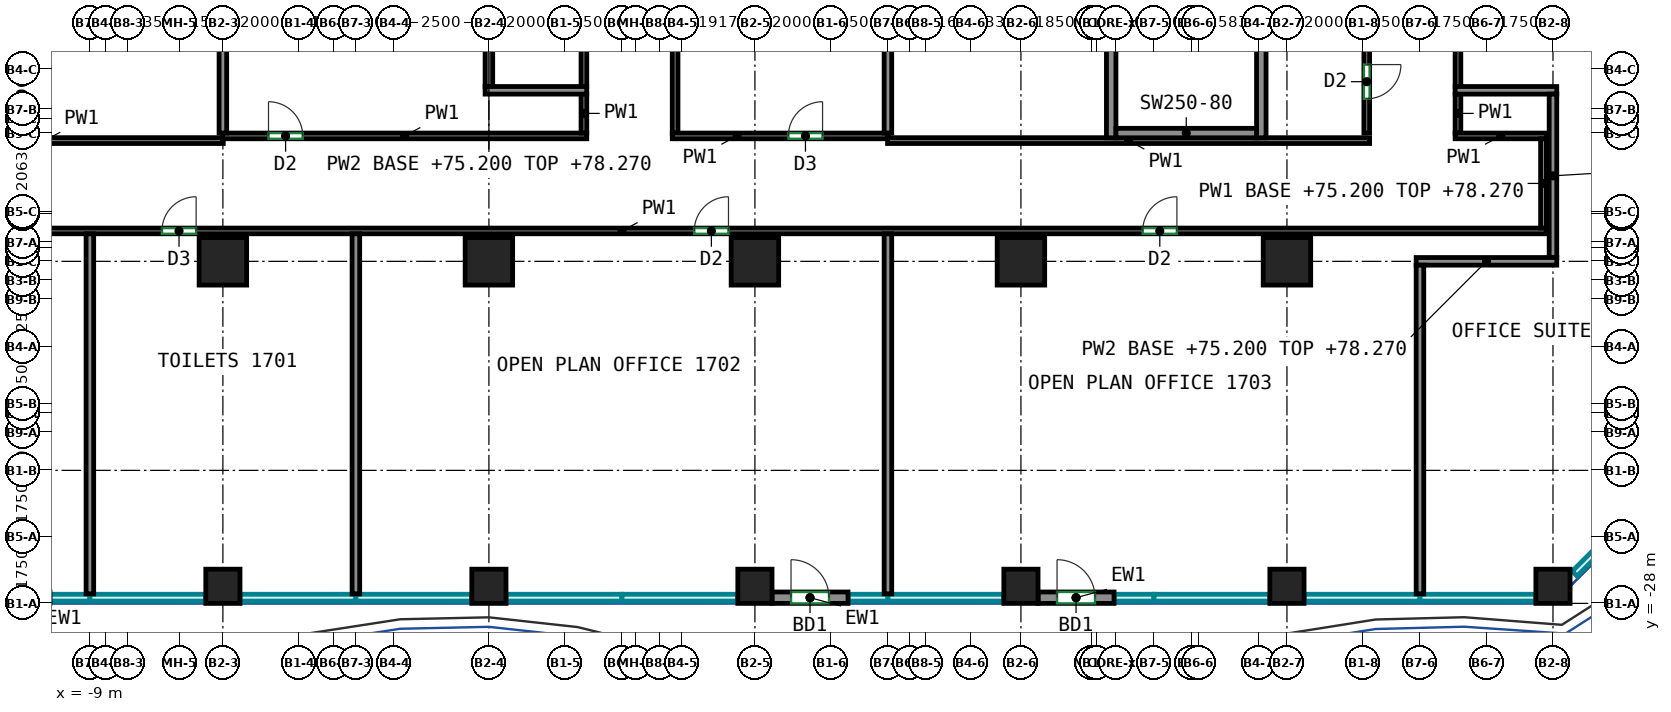
"""IFC4 building model, lengths in metres.
Left out: names, types, materials, properties, quantities, classifications, styles, units other than length and angle.
Written with IfcOpenShell. Run it as: python <this file> out.ifc"""

import sys

from ifc_helpers import new_model, si_unit, direction, frame, frame_2d, origin, origin_2d, place, context, subcontext, project, spatial, rectangle, extrude, source, transform, mapped, element, fill, save


model = new_model("IFC4")
c1 = context("Model", 3, precision=1e-05, world=origin(), true_north=direction((0.0, 1.0)))
c2 = subcontext(c1, "Body", "Model", "MODEL_VIEW")
j1 = project(units=[si_unit("LENGTHUNIT", "METRE"), si_unit("PLANEANGLEUNIT", "RADIAN")], contexts=[c1])
p1 = place(None, origin())
s1 = spatial("IfcSite", under=j1, at=p1, CompositionType="ELEMENT")
p2 = place(p1, origin())
s2 = spatial("IfcBuilding", under=s1, at=p2, CompositionType="ELEMENT")
p3 = place(p2, frame((0.0, 0.0, 75.2)))
s3 = spatial("IfcBuildingStorey", under=s2, at=p3, CompositionType="ELEMENT", Elevation=75.2)
m1 = source(origin(), c2, "Body", "SweptSolid", [
    extrude(rectangle(XDim=0.9, YDim=0.9, at=origin_2d()), origin(), (0.0, 0.0, 1.0), 3.72),
])
p4 = place(p3, frame((-5.5, -27.55, 0.0), z_axis=(0.0, 0.0, 1.0), x_axis=(1.0, 0.0, 0.0)))
e1 = element("IfcColumn", 1, at=p4, inside=s3, PredefinedType="COLUMN", context=c2, shape_type="MappedRepresentation", body=[
    mapped(m1, transform((0.0, 0.0, 0.0))),
])
m2 = source(origin(), c2, "Body", "SweptSolid", [
    extrude(rectangle(XDim=1.25, YDim=1.25, at=origin_2d()), origin(), (0.0, 0.0, 1.0), 3.72),
])
p5 = place(p3, frame((-5.5, -19.0, 0.0), z_axis=(0.0, 0.0, 1.0), x_axis=(1.0, 0.0, 0.0)))
e2 = element("IfcColumn", 2, at=p5, inside=s3, PredefinedType="COLUMN", context=c2, shape_type="MappedRepresentation", body=[
    mapped(m2, transform((0.0, 0.0, 0.0))),
])
p6 = place(p3, frame((1.5, -27.55, 0.0), z_axis=(0.0, 0.0, 1.0), x_axis=(1.0, 0.0, 0.0)))
e3 = element("IfcColumn", 3, at=p6, inside=s3, PredefinedType="COLUMN", context=c2, shape_type="MappedRepresentation", body=[
    mapped(m1, transform((0.0, 0.0, 0.0))),
])
p7 = place(p3, frame((1.5, -19.0, 0.0), z_axis=(0.0, 0.0, 1.0), x_axis=(1.0, 0.0, 0.0)))
e4 = element("IfcColumn", 4, at=p7, inside=s3, PredefinedType="COLUMN", context=c2, shape_type="MappedRepresentation", body=[
    mapped(m2, transform((0.0, 0.0, 0.0))),
])
p8 = place(p3, frame((8.5, -27.55, 0.0), z_axis=(0.0, 0.0, 1.0), x_axis=(1.0, 0.0, 0.0)))
e5 = element("IfcColumn", 5, at=p8, inside=s3, PredefinedType="COLUMN", context=c2, shape_type="MappedRepresentation", body=[
    mapped(m1, transform((0.0, 0.0, 0.0))),
])
p9 = place(p3, frame((8.5, -19.0, 0.0), z_axis=(0.0, 0.0, 1.0), x_axis=(1.0, 0.0, 0.0)))
e6 = element("IfcColumn", 6, at=p9, inside=s3, PredefinedType="COLUMN", context=c2, shape_type="MappedRepresentation", body=[
    mapped(m2, transform((0.0, 0.0, 0.0))),
])
p10 = place(p3, frame((15.5, -27.55, 0.0), z_axis=(0.0, 0.0, 1.0), x_axis=(1.0, 0.0, 0.0)))
e7 = element("IfcColumn", 7, at=p10, inside=s3, PredefinedType="COLUMN", context=c2, shape_type="MappedRepresentation", body=[
    mapped(m1, transform((0.0, 0.0, 0.0))),
])
p11 = place(p3, frame((15.5, -19.0, 0.0), z_axis=(0.0, 0.0, 1.0), x_axis=(1.0, 0.0, 0.0)))
e8 = element("IfcColumn", 8, at=p11, inside=s3, PredefinedType="COLUMN", context=c2, shape_type="MappedRepresentation", body=[
    mapped(m2, transform((0.0, 0.0, 0.0))),
])
p12 = place(p3, frame((22.5, -27.55, 0.0), z_axis=(0.0, 0.0, 1.0), x_axis=(1.0, 0.0, 0.0)))
e9 = element("IfcColumn", 9, at=p12, inside=s3, PredefinedType="COLUMN", context=c2, shape_type="MappedRepresentation", body=[
    mapped(m1, transform((0.0, 0.0, 0.0))),
])
p13 = place(p3, frame((22.5, -19.0, 0.0), z_axis=(0.0, 0.0, 1.0), x_axis=(1.0, 0.0, 0.0)))
e10 = element("IfcColumn", 10, at=p13, inside=s3, PredefinedType="COLUMN", context=c2, shape_type="MappedRepresentation", body=[
    mapped(m2, transform((0.0, 0.0, 0.0))),
])
p14 = place(p3, frame((29.5, -27.55, 0.0), z_axis=(0.0, 0.0, 1.0), x_axis=(1.0, 0.0, 0.0)))
e11 = element("IfcColumn", 11, at=p14, inside=s3, PredefinedType="COLUMN", context=c2, shape_type="MappedRepresentation", body=[
    mapped(m1, transform((0.0, 0.0, 0.0))),
])
m3 = source(origin(), c2, "Body", "SweptSolid", [
    extrude(rectangle(XDim=8.0, YDim=0.25, at=frame_2d((4.0, 0.0))), origin(), (0.0, 0.0, 1.0), 3.72),
])
for number, where, z_axis, x_axis in (
    (12, (17.875, -15.75, 0.0), (0.0, 0.0, 1.0), (0.0, 1.0, 0.0)),
    (13, (21.825, -15.75, 0.0), (0.0, 0.0, 1.0), (0.0, 1.0, 0.0)),
):
    element("IfcWall", number, at=place(p3, frame(where, z_axis=z_axis, x_axis=x_axis)), inside=s3, PredefinedType="SHEAR", context=c2, shape_type="MappedRepresentation", body=[
        mapped(m3, transform((0.0, 0.0, 0.0))),
    ])
m4 = source(origin(), c2, "Body", "SweptSolid", [
    extrude(rectangle(XDim=3.7, YDim=0.25, at=frame_2d((1.85, 0.0))), origin(), (0.0, 0.0, 1.0), 3.72),
])
p15 = place(p3, frame((18.0, -15.625, 0.0), z_axis=(0.0, 0.0, 1.0), x_axis=(1.0, 0.0, 0.0)))
e14 = element("IfcWall", 14, at=p15, inside=s3, PredefinedType="SHEAR", context=c2, shape_type="MappedRepresentation", body=[
    mapped(m4, transform((0.0, 0.0, 0.0))),
])
m5 = source(origin(), c2, "Body", "SweptSolid", [
    extrude(rectangle(XDim=2.0, YDim=0.3, at=frame_2d((1.0, 0.0))), origin(), (0.0, 0.0, 1.0), 3.72),
])
p16 = place(p3, frame((8.95, -27.85, 0.0), z_axis=(0.0, 0.0, 1.0), x_axis=(1.0, 0.0, 0.0)))
e15 = element("IfcWall", 15, at=p16, inside=s3, PredefinedType="SOLIDWALL", context=c2, shape_type="MappedRepresentation", body=[
    mapped(m5, transform((0.0, 0.0, 0.0))),
])
p17 = place(p16, frame((0.5, 0.0, 0.0)))
e16 = element("IfcOpeningElement", 16, at=p17, cuts=e15, PredefinedType="OPENING", context=c2, shape_type="SweptSolid", body=[
    extrude(rectangle(XDim=1.0, YDim=2.1, at=frame_2d((0.5, 1.05))), frame((0.0, 0.16, 0.0), z_axis=(0.0, -1.0, 0.0), x_axis=(1.0, 0.0, 0.0)), (0.0, 0.0, 1.0), 0.32),
])
p18 = place(p3, frame((15.95, -27.85, 0.0), z_axis=(0.0, 0.0, 1.0), x_axis=(1.0, 0.0, 0.0)))
e17 = element("IfcWall", 17, at=p18, inside=s3, PredefinedType="SOLIDWALL", context=c2, shape_type="MappedRepresentation", body=[
    mapped(m5, transform((0.0, 0.0, 0.0))),
])
p19 = place(p18, frame((0.5, 0.0, 0.0)))
e18 = element("IfcOpeningElement", 18, at=p19, cuts=e17, PredefinedType="OPENING", context=c2, shape_type="SweptSolid", body=[
    extrude(rectangle(XDim=1.0, YDim=2.1, at=frame_2d((0.5, 1.05))), frame((0.0, 0.16, 0.0), z_axis=(0.0, -1.0, 0.0), x_axis=(1.0, 0.0, 0.0)), (0.0, 0.0, 1.0), 0.32),
])
p20 = place(p3, frame((-19.325, -18.2, 0.0), z_axis=(0.0, 0.0, 1.0), x_axis=(1.0, 0.0, 0.0)))
e19 = element("IfcWall", 19, at=p20, inside=s3, PredefinedType="PARTITIONING", context=c2, shape_type="SweptSolid", body=[
    extrude(rectangle(XDim=48.65, YDim=0.15, at=frame_2d((24.325, 0.0))), origin(), (0.0, 0.0, 1.0), 3.72),
])
p21 = place(p20, frame((12.221, 0.0, 0.0)))
e20 = element("IfcOpeningElement", 20, at=p21, cuts=e19, PredefinedType="OPENING", context=c2, shape_type="SweptSolid", body=[
    extrude(rectangle(XDim=0.9, YDim=2.1, at=frame_2d((0.45, 1.05))), frame((0.0, 0.085, 0.0), z_axis=(0.0, -1.0, 0.0), x_axis=(1.0, 0.0, 0.0)), (0.0, 0.0, 1.0), 0.17),
])
p22 = place(p20, frame((26.229, 0.0, 0.0)))
e21 = element("IfcOpeningElement", 21, at=p22, cuts=e19, PredefinedType="OPENING", context=c2, shape_type="SweptSolid", body=[
    extrude(rectangle(XDim=0.9, YDim=2.1, at=frame_2d((0.45, 1.05))), frame((0.0, 0.085, 0.0), z_axis=(0.0, -1.0, 0.0), x_axis=(1.0, 0.0, 0.0)), (0.0, 0.0, 1.0), 0.17),
])
p23 = place(p20, frame((38.029, 0.0, 0.0)))
e22 = element("IfcOpeningElement", 22, at=p23, cuts=e19, PredefinedType="OPENING", context=c2, shape_type="SweptSolid", body=[
    extrude(rectangle(XDim=0.9, YDim=2.1, at=frame_2d((0.45, 1.05))), frame((0.0, 0.085, 0.0), z_axis=(0.0, -1.0, 0.0), x_axis=(1.0, 0.0, 0.0)), (0.0, 0.0, 1.0), 0.17),
])
p24 = place(p3, frame((-14.9, -15.825, 0.0), z_axis=(0.0, 0.0, 1.0), x_axis=(1.0, 0.0, 0.0)))
e23 = element("IfcWall", 23, at=p24, inside=s3, PredefinedType="PARTITIONING", context=c2, shape_type="SweptSolid", body=[
    extrude(rectangle(XDim=9.41, YDim=0.15, at=frame_2d((4.705, 0.0))), origin(), (0.0, 0.0, 1.0), 3.72),
])
p25 = place(p3, frame((-5.51, -15.7, 0.0), z_axis=(0.0, 0.0, 1.0), x_axis=(1.0, 0.0, 0.0)))
e24 = element("IfcWall", 24, at=p25, inside=s3, PredefinedType="PARTITIONING", context=c2, shape_type="SweptSolid", body=[
    extrude(rectangle(XDim=9.585, YDim=0.15, at=frame_2d((4.792, 0.0))), origin(), (0.0, 0.0, 1.0), 3.72),
])
p26 = place(p25, frame((1.21, 0.0, 0.0)))
e25 = element("IfcOpeningElement", 25, at=p26, cuts=e24, PredefinedType="OPENING", context=c2, shape_type="SweptSolid", body=[
    extrude(rectangle(XDim=0.9, YDim=2.1, at=frame_2d((0.45, 1.05))), frame((0.0, 0.085, 0.0), z_axis=(0.0, -1.0, 0.0), x_axis=(1.0, 0.0, 0.0)), (0.0, 0.0, 1.0), 0.17),
])
p27 = place(p3, frame((4.0, -15.625, 0.0), z_axis=(0.0, 0.0, 1.0), x_axis=(0.0, 1.0, 0.0)))
e26 = element("IfcWall", 26, at=p27, inside=s3, PredefinedType="PARTITIONING", context=c2, shape_type="SweptSolid", body=[
    extrude(rectangle(XDim=1.035, YDim=0.15, at=frame_2d((0.518, 0.0))), origin(), (0.0, 0.0, 1.0), 3.72),
])
p28 = place(p3, frame((4.0, -14.41, 0.0), z_axis=(0.0, 0.0, 1.0), x_axis=(0.0, 1.0, 0.0)))
e27 = element("IfcWall", 27, at=p28, inside=s3, PredefinedType="PARTITIONING", context=c2, shape_type="SweptSolid", body=[
    extrude(rectangle(XDim=16.635, YDim=0.15, at=frame_2d((8.317, 0.0))), origin(), (0.0, 0.0, 1.0), 3.72),
])
p29 = place(p28, frame((6.114, 0.0, 0.0)))
e28 = element("IfcOpeningElement", 28, at=p29, cuts=e27, PredefinedType="OPENING", context=c2, shape_type="SweptSolid", body=[
    extrude(rectangle(XDim=1.0, YDim=2.1, at=frame_2d((0.5, 1.05))), frame((0.0, 0.085, 0.0), z_axis=(0.0, -1.0, 0.0), x_axis=(1.0, 0.0, 0.0)), (0.0, 0.0, 1.0), 0.17),
])
p30 = place(p3, frame((27.0, -15.625, 0.0), z_axis=(0.0, 0.0, 1.0), x_axis=(0.0, 1.0, 0.0)))
e29 = element("IfcWall", 29, at=p30, inside=s3, PredefinedType="PARTITIONING", context=c2, shape_type="SweptSolid", body=[
    extrude(rectangle(XDim=1.035, YDim=0.15, at=frame_2d((0.518, 0.0))), origin(), (0.0, 0.0, 1.0), 3.72),
])
p31 = place(p3, frame((26.925, -15.7, 0.0), z_axis=(0.0, 0.0, 1.0), x_axis=(1.0, 0.0, 0.0)))
e30 = element("IfcWall", 30, at=p31, inside=s3, PredefinedType="PARTITIONING", context=c2, shape_type="SweptSolid", body=[
    extrude(rectangle(XDim=2.4, YDim=0.15, at=frame_2d((1.2, 0.0))), origin(), (0.0, 0.0, 1.0), 3.72),
])
p32 = place(p3, frame((29.25, -18.125, 0.0), z_axis=(0.0, 0.0, 1.0), x_axis=(0.0, 1.0, 0.0)))
e31 = element("IfcWall", 31, at=p32, inside=s3, PredefinedType="PARTITIONING", context=c2, shape_type="SweptSolid", body=[
    extrude(rectangle(XDim=2.35, YDim=0.15, at=frame_2d((1.175, 0.0))), origin(), (0.0, 0.0, 1.0), 3.07),
])
p33 = place(p3, frame((6.4, -15.625, 0.0), z_axis=(0.0, 0.0, 1.0), x_axis=(0.0, 1.0, 0.0)))
e32 = element("IfcWall", 32, at=p33, inside=s3, PredefinedType="PARTITIONING", context=c2, shape_type="SweptSolid", body=[
    extrude(rectangle(XDim=5.535, YDim=0.15, at=frame_2d((2.768, 0.0))), origin(), (0.0, 0.0, 1.0), 3.72),
])
p34 = place(p3, frame((6.325, -15.7, 0.0), z_axis=(0.0, 0.0, 1.0), x_axis=(1.0, 0.0, 0.0)))
e33 = element("IfcWall", 33, at=p34, inside=s3, PredefinedType="PARTITIONING", context=c2, shape_type="SweptSolid", body=[
    extrude(rectangle(XDim=5.685, YDim=0.15, at=frame_2d((2.843, 0.0))), origin(), (0.0, 0.0, 1.0), 3.72),
])
p35 = place(p34, frame((3.055, 0.0, 0.0)))
e34 = element("IfcOpeningElement", 34, at=p35, cuts=e33, PredefinedType="OPENING", context=c2, shape_type="SweptSolid", body=[
    extrude(rectangle(XDim=0.9, YDim=2.1, at=frame_2d((0.45, 1.05))), frame((0.0, 0.085, 0.0), z_axis=(0.0, -1.0, 0.0), x_axis=(1.0, 0.0, 0.0)), (0.0, 0.0, 1.0), 0.17),
])
p36 = place(p3, frame((11.99, -15.825, 0.0), z_axis=(0.0, 0.0, 1.0), x_axis=(1.0, 0.0, 0.0)))
e35 = element("IfcWall", 35, at=p36, inside=s3, PredefinedType="PARTITIONING", context=c2, shape_type="SweptSolid", body=[
    extrude(rectangle(XDim=12.685, YDim=0.15, at=frame_2d((6.343, 0.0))), origin(), (0.0, 0.0, 1.0), 3.72),
])
p37 = place(p3, frame((24.6, 2.225, 0.0), z_axis=(0.0, 0.0, 1.0), x_axis=(0.0, -1.0, 0.0)))
e36 = element("IfcWall", 36, at=p37, inside=s3, PredefinedType="PARTITIONING", context=c2, shape_type="SweptSolid", body=[
    extrude(rectangle(XDim=17.85, YDim=0.15, at=frame_2d((8.925, 0.0))), origin(), (0.0, 0.0, 1.0), 3.72),
])
p38 = place(p37, frame((16.048, 0.0, 0.0)))
e37 = element("IfcOpeningElement", 37, at=p38, cuts=e36, PredefinedType="OPENING", context=c2, shape_type="SweptSolid", body=[
    extrude(rectangle(XDim=0.9, YDim=2.1, at=frame_2d((0.45, 1.05))), frame((0.0, 0.085, 0.0), z_axis=(0.0, -1.0, 0.0), x_axis=(1.0, 0.0, 0.0)), (0.0, 0.0, 1.0), 0.17),
])
p39 = place(p3, frame((27.0, -14.41, 0.0), z_axis=(0.0, 0.0, 1.0), x_axis=(0.0, 1.0, 0.0)))
e38 = element("IfcWall", 38, at=p39, inside=s3, PredefinedType="PARTITIONING", context=c2, shape_type="SweptSolid", body=[
    extrude(rectangle(XDim=16.635, YDim=0.15, at=frame_2d((8.317, 0.0))), origin(), (0.0, 0.0, 1.0), 3.72),
])
p40 = place(p39, frame((4.41, 0.0, 0.0)))
e39 = element("IfcOpeningElement", 39, at=p40, cuts=e38, PredefinedType="OPENING", context=c2, shape_type="SweptSolid", body=[
    extrude(rectangle(XDim=1.0, YDim=2.1, at=frame_2d((0.5, 1.05))), frame((0.0, 0.085, 0.0), z_axis=(0.0, -1.0, 0.0), x_axis=(1.0, 0.0, 0.0)), (0.0, 0.0, 1.0), 0.17),
])
p41 = place(p3, frame((-9.0, -27.75, 0.0), z_axis=(0.0, 0.0, 1.0), x_axis=(0.0, 1.0, 0.0)))
e40 = element("IfcWall", 40, at=p41, inside=s3, PredefinedType="PARTITIONING", context=c2, shape_type="SweptSolid", body=[
    extrude(rectangle(XDim=9.474, YDim=0.2, at=frame_2d((4.737, 0.0))), origin(), (0.0, 0.0, 1.0), 3.72),
])
p42 = place(p3, frame((-5.5, -15.624, 0.0), z_axis=(0.0, 0.0, 1.0), x_axis=(0.0, 1.0, 0.0)))
e41 = element("IfcWall", 41, at=p42, inside=s3, PredefinedType="PARTITIONING", context=c2, shape_type="SweptSolid", body=[
    extrude(rectangle(XDim=4.999, YDim=0.2, at=frame_2d((2.5, 0.0))), origin(), (0.0, 0.0, 1.0), 3.07),
])
p43 = place(p3, frame((-2.0, -27.75, 0.0), z_axis=(0.0, 0.0, 1.0), x_axis=(0.0, 1.0, 0.0)))
e42 = element("IfcWall", 42, at=p43, inside=s3, PredefinedType="PARTITIONING", context=c2, shape_type="SweptSolid", body=[
    extrude(rectangle(XDim=9.474, YDim=0.2, at=frame_2d((4.737, 0.0))), origin(), (0.0, 0.0, 1.0), 3.72),
])
p44 = place(p3, frame((1.5, -14.4, 0.0), z_axis=(0.0, 0.0, 1.0), x_axis=(0.0, 1.0, 0.0)))
e43 = element("IfcWall", 43, at=p44, inside=s3, PredefinedType="PARTITIONING", context=c2, shape_type="SweptSolid", body=[
    extrude(rectangle(XDim=3.775, YDim=0.2, at=frame_2d((1.887, 0.0))), origin(), (0.0, 0.0, 1.0), 3.07),
])
p45 = place(p3, frame((1.4, -14.5, 0.0), z_axis=(0.0, 0.0, 1.0), x_axis=(1.0, 0.0, 0.0)))
e44 = element("IfcWall", 44, at=p45, inside=s3, PredefinedType="PARTITIONING", context=c2, shape_type="SweptSolid", body=[
    extrude(rectangle(XDim=2.674, YDim=0.2, at=frame_2d((1.337, 0.0))), origin(), (0.0, 0.0, 1.0), 3.72),
])
p46 = place(p3, frame((12.0, -27.75, 0.0), z_axis=(0.0, 0.0, 1.0), x_axis=(0.0, 1.0, 0.0)))
e45 = element("IfcWall", 45, at=p46, inside=s3, PredefinedType="PARTITIONING", context=c2, shape_type="SweptSolid", body=[
    extrude(rectangle(XDim=9.474, YDim=0.2, at=frame_2d((4.737, 0.0))), origin(), (0.0, 0.0, 1.0), 3.72),
])
p47 = place(p3, frame((26.926, -14.5, 0.0), z_axis=(0.0, 0.0, 1.0), x_axis=(1.0, 0.0, 0.0)))
e46 = element("IfcWall", 46, at=p47, inside=s3, PredefinedType="PARTITIONING", context=c2, shape_type="SweptSolid", body=[
    extrude(rectangle(XDim=2.674, YDim=0.2, at=frame_2d((1.337, 0.0))), origin(), (0.0, 0.0, 1.0), 3.72),
])
p48 = place(p3, frame((29.5, -18.9, 0.0), z_axis=(0.0, 0.0, 1.0), x_axis=(0.0, 1.0, 0.0)))
e47 = element("IfcWall", 47, at=p48, inside=s3, PredefinedType="PARTITIONING", context=c2, shape_type="SweptSolid", body=[
    extrude(rectangle(XDim=4.3, YDim=0.2, at=frame_2d((2.15, 0.0))), origin(), (0.0, 0.0, 1.0), 3.07),
])
p49 = place(p3, frame((25.9, -19.0, 0.0), z_axis=(0.0, 0.0, 1.0), x_axis=(1.0, 0.0, 0.0)))
e48 = element("IfcWall", 48, at=p49, inside=s3, PredefinedType="PARTITIONING", context=c2, shape_type="SweptSolid", body=[
    extrude(rectangle(XDim=3.7, YDim=0.2, at=frame_2d((1.85, 0.0))), origin(), (0.0, 0.0, 1.0), 3.07),
])
p50 = place(p3, frame((26.0, -27.75, 0.0), z_axis=(0.0, 0.0, 1.0), x_axis=(0.0, 1.0, 0.0)))
e49 = element("IfcWall", 49, at=p50, inside=s3, PredefinedType="PARTITIONING", context=c2, shape_type="SweptSolid", body=[
    extrude(rectangle(XDim=8.65, YDim=0.2, at=frame_2d((4.325, 0.0))), origin(), (0.0, 0.0, 1.0), 3.72),
])
p51 = place(p3, frame((12.0, -15.624, 0.0), z_axis=(0.0, 0.0, 1.0), x_axis=(0.0, 1.0, 0.0)))
e50 = element("IfcWall", 50, at=p51, inside=s3, PredefinedType="PARTITIONING", context=c2, shape_type="SweptSolid", body=[
    extrude(rectangle(XDim=5.524, YDim=0.2, at=frame_2d((2.762, 0.0))), origin(), (0.0, 0.0, 1.0), 3.72),
])
p52 = place(p17, origin())
e51 = element("IfcDoor", 51, at=p52, inside=s3, OperationType="SINGLE_SWING_LEFT", PredefinedType="DOOR", context=c2, shape_type="SweptSolid", body=[
    extrude(rectangle(XDim=1.0, YDim=2.1, at=frame_2d((0.5, 1.05))), frame((0.0, 0.025, 0.0), z_axis=(0.0, -1.0, 0.0), x_axis=(1.0, 0.0, 0.0)), (0.0, 0.0, 1.0), 0.05),
])
fill(e16, e51)
p53 = place(p19, origin())
e52 = element("IfcDoor", 52, at=p53, inside=s3, OperationType="SINGLE_SWING_LEFT", PredefinedType="DOOR", context=c2, shape_type="SweptSolid", body=[
    extrude(rectangle(XDim=1.0, YDim=2.1, at=frame_2d((0.5, 1.05))), frame((0.0, 0.025, 0.0), z_axis=(0.0, -1.0, 0.0), x_axis=(1.0, 0.0, 0.0)), (0.0, 0.0, 1.0), 0.05),
])
fill(e18, e52)
p54 = place(p21, origin())
e53 = element("IfcDoor", 53, at=p54, inside=s3, OperationType="SINGLE_SWING_RIGHT", PredefinedType="DOOR", context=c2, shape_type="SweptSolid", body=[
    extrude(rectangle(XDim=0.9, YDim=2.1, at=frame_2d((0.45, 1.05))), frame((0.0, 0.025, 0.0), z_axis=(0.0, -1.0, 0.0), x_axis=(1.0, 0.0, 0.0)), (0.0, 0.0, 1.0), 0.05),
])
fill(e20, e53)
p55 = place(p22, origin())
e54 = element("IfcDoor", 54, at=p55, inside=s3, OperationType="SINGLE_SWING_RIGHT", PredefinedType="DOOR", context=c2, shape_type="SweptSolid", body=[
    extrude(rectangle(XDim=0.9, YDim=2.1, at=frame_2d((0.45, 1.05))), frame((0.0, 0.025, 0.0), z_axis=(0.0, -1.0, 0.0), x_axis=(1.0, 0.0, 0.0)), (0.0, 0.0, 1.0), 0.05),
])
fill(e21, e54)
p56 = place(p23, origin())
e55 = element("IfcDoor", 55, at=p56, inside=s3, OperationType="SINGLE_SWING_RIGHT", PredefinedType="DOOR", context=c2, shape_type="SweptSolid", body=[
    extrude(rectangle(XDim=0.9, YDim=2.1, at=frame_2d((0.45, 1.05))), frame((0.0, 0.025, 0.0), z_axis=(0.0, -1.0, 0.0), x_axis=(1.0, 0.0, 0.0)), (0.0, 0.0, 1.0), 0.05),
])
fill(e22, e55)
p57 = place(p26, origin())
e56 = element("IfcDoor", 56, at=p57, inside=s3, OperationType="SINGLE_SWING_LEFT", PredefinedType="DOOR", context=c2, shape_type="SweptSolid", body=[
    extrude(rectangle(XDim=0.9, YDim=2.1, at=frame_2d((0.45, 1.05))), frame((0.0, 0.025, 0.0), z_axis=(0.0, -1.0, 0.0), x_axis=(1.0, 0.0, 0.0)), (0.0, 0.0, 1.0), 0.05),
])
fill(e25, e56)
p58 = place(p35, origin())
e57 = element("IfcDoor", 57, at=p58, inside=s3, OperationType="SINGLE_SWING_RIGHT", PredefinedType="DOOR", context=c2, shape_type="SweptSolid", body=[
    extrude(rectangle(XDim=0.9, YDim=2.1, at=frame_2d((0.45, 1.05))), frame((0.0, 0.025, 0.0), z_axis=(0.0, -1.0, 0.0), x_axis=(1.0, 0.0, 0.0)), (0.0, 0.0, 1.0), 0.05),
])
fill(e34, e57)
p59 = place(p38, origin())
e58 = element("IfcDoor", 58, at=p59, inside=s3, OperationType="SINGLE_SWING_LEFT", PredefinedType="DOOR", context=c2, shape_type="SweptSolid", body=[
    extrude(rectangle(XDim=0.9, YDim=2.1, at=frame_2d((0.45, 1.05))), frame((0.0, 0.025, 0.0), z_axis=(0.0, -1.0, 0.0), x_axis=(1.0, 0.0, 0.0)), (0.0, 0.0, 1.0), 0.05),
])
fill(e37, e58)
save(model, sys.argv[1])
